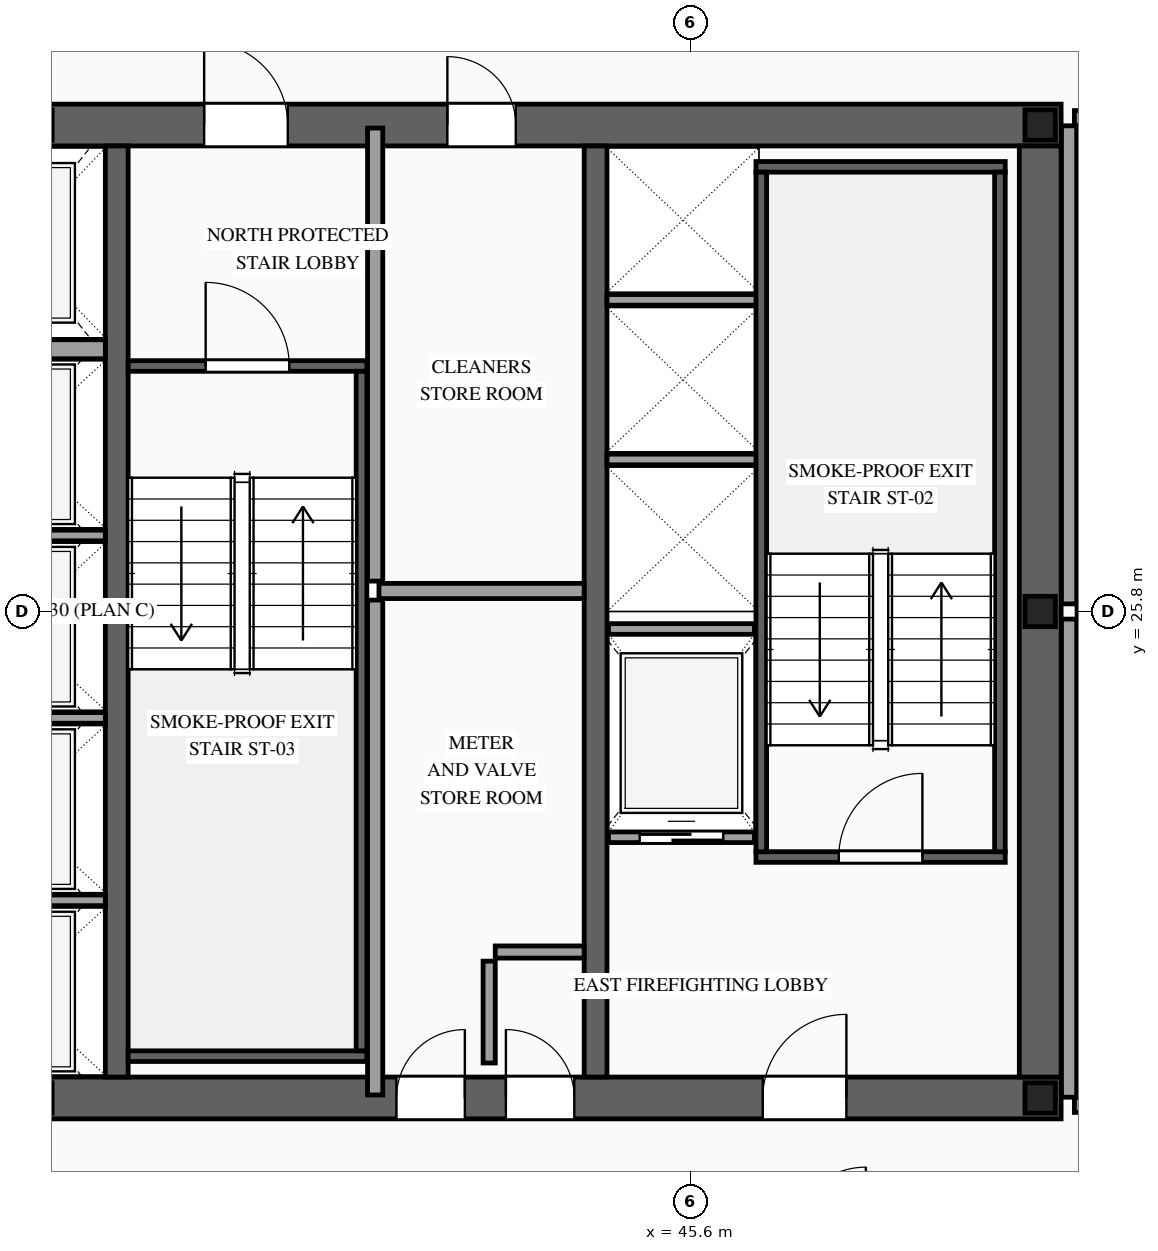
"""IFC4 building model, lengths in metres.
Left out: names, types, materials, properties, quantities, classifications, styles, units other than length and angle.
Written with IfcOpenShell. Run it as: python <this file> out.ifc"""

import sys

from ifc_helpers import new_model, si_unit, direction, frame, frame_2d, origin, origin_2d, place, context, subcontext, project, spatial, rectangle, i_section, extrude, source, transform, mapped, element, fill, save


model = new_model("IFC4")
c1 = context("Model", 3, precision=1e-05, world=origin(), true_north=direction((0.0, 1.0)))
c2 = subcontext(c1, "Body", "Model", "MODEL_VIEW")
j1 = project(units=[si_unit("LENGTHUNIT", "METRE"), si_unit("PLANEANGLEUNIT", "RADIAN")], contexts=[c1])
p1 = place(None, origin())
s1 = spatial("IfcSite", under=j1, at=p1, CompositionType="ELEMENT")
p2 = place(p1, origin())
s2 = spatial("IfcBuilding", under=s1, at=p2, CompositionType="ELEMENT")
p3 = place(p2, frame((0.0, 0.0, 255.6)))
s3 = spatial("IfcBuildingStorey", under=s2, at=p3, CompositionType="ELEMENT", Elevation=255.6)
p4 = place(p3, frame((23.525, 19.4, 0.0), z_axis=(0.0, 0.0, 1.0), x_axis=(1.0, 0.0, 0.0)))
e1 = element("IfcWall", 1, at=p4, inside=s3, PredefinedType="SHEAR", context=c2, shape_type="SweptSolid", body=[
    extrude(rectangle(XDim=26.95, YDim=0.55, at=frame_2d((13.475, 0.0))), origin(), (0.0, 0.0, 1.0), 3.5),
])
p5 = place(p4, frame((1.925, 0.0, 0.0)))
e2 = element("IfcOpeningElement", 2, at=p5, cuts=e1, PredefinedType="OPENING", context=c2, shape_type="SweptSolid", body=[
    extrude(rectangle(XDim=1.1, YDim=2.2, at=frame_2d((0.55, 1.1))), frame((0.0, 0.29, 0.0), z_axis=(0.0, -1.0, 0.0), x_axis=(1.0, 0.0, 0.0)), (0.0, 0.0, 1.0), 0.58),
])
p6 = place(p4, frame((9.825, 0.0, 0.0)))
e3 = element("IfcOpeningElement", 3, at=p6, cuts=e1, PredefinedType="OPENING", context=c2, shape_type="SweptSolid", body=[
    extrude(rectangle(XDim=1.1, YDim=2.2, at=frame_2d((0.55, 1.1))), frame((0.0, 0.29, 0.0), z_axis=(0.0, -1.0, 0.0), x_axis=(1.0, 0.0, 0.0)), (0.0, 0.0, 1.0), 0.58),
])
p7 = place(p4, frame((23.025, 0.0, 0.0)))
e4 = element("IfcOpeningElement", 4, at=p7, cuts=e1, PredefinedType="OPENING", context=c2, shape_type="SweptSolid", body=[
    extrude(rectangle(XDim=1.1, YDim=2.2, at=frame_2d((0.55, 1.1))), frame((0.0, 0.29, 0.0), z_axis=(0.0, -1.0, 0.0), x_axis=(1.0, 0.0, 0.0)), (0.0, 0.0, 1.0), 0.58),
])
p8 = place(p4, frame((19.645, 0.0, 0.0)))
e5 = element("IfcOpeningElement", 5, at=p8, cuts=e1, PredefinedType="OPENING", context=c2, shape_type="SweptSolid", body=[
    extrude(rectangle(XDim=0.9, YDim=2.15, at=frame_2d((0.45, 1.075))), frame((0.0, 0.29, 0.0), z_axis=(0.0, -1.0, 0.0), x_axis=(1.0, 0.0, 0.0)), (0.0, 0.0, 1.0), 0.58),
])
p9 = place(p4, frame((18.205, 0.0, 0.0)))
e6 = element("IfcOpeningElement", 6, at=p9, cuts=e1, PredefinedType="OPENING", context=c2, shape_type="SweptSolid", body=[
    extrude(rectangle(XDim=0.9, YDim=2.15, at=frame_2d((0.45, 1.075))), frame((0.0, 0.29, 0.0), z_axis=(0.0, -1.0, 0.0), x_axis=(1.0, 0.0, 0.0)), (0.0, 0.0, 1.0), 0.58),
])
p10 = place(p3, frame((23.525, 32.2, 0.0), z_axis=(0.0, 0.0, 1.0), x_axis=(1.0, 0.0, 0.0)))
e7 = element("IfcWall", 7, at=p10, inside=s3, PredefinedType="SHEAR", context=c2, shape_type="SweptSolid", body=[
    extrude(rectangle(XDim=26.95, YDim=0.55, at=frame_2d((13.475, 0.0))), origin(), (0.0, 0.0, 1.0), 3.5),
])
p11 = place(p10, frame((4.545, 0.0, 0.0)))
e8 = element("IfcOpeningElement", 8, at=p11, cuts=e7, PredefinedType="OPENING", context=c2, shape_type="SweptSolid", body=[
    extrude(rectangle(XDim=0.9, YDim=2.15, at=frame_2d((0.45, 1.075))), frame((0.0, 0.29, 0.0), z_axis=(0.0, -1.0, 0.0), x_axis=(1.0, 0.0, 0.0)), (0.0, 0.0, 1.0), 0.58),
])
p12 = place(p10, frame((9.825, 0.0, 0.0)))
e9 = element("IfcOpeningElement", 9, at=p12, cuts=e7, PredefinedType="OPENING", context=c2, shape_type="SweptSolid", body=[
    extrude(rectangle(XDim=1.1, YDim=2.2, at=frame_2d((0.55, 1.1))), frame((0.0, 0.29, 0.0), z_axis=(0.0, -1.0, 0.0), x_axis=(1.0, 0.0, 0.0)), (0.0, 0.0, 1.0), 0.58),
])
p13 = place(p10, frame((15.675, 0.0, 0.0)))
e10 = element("IfcOpeningElement", 10, at=p13, cuts=e7, PredefinedType="OPENING", context=c2, shape_type="SweptSolid", body=[
    extrude(rectangle(XDim=1.1, YDim=2.2, at=frame_2d((0.55, 1.1))), frame((0.0, 0.29, 0.0), z_axis=(0.0, -1.0, 0.0), x_axis=(1.0, 0.0, 0.0)), (0.0, 0.0, 1.0), 0.58),
])
p14 = place(p10, frame((18.875, 0.0, 0.0)))
e11 = element("IfcOpeningElement", 11, at=p14, cuts=e7, PredefinedType="OPENING", context=c2, shape_type="SweptSolid", body=[
    extrude(rectangle(XDim=0.9, YDim=2.15, at=frame_2d((0.45, 1.075))), frame((0.0, 0.29, 0.0), z_axis=(0.0, -1.0, 0.0), x_axis=(1.0, 0.0, 0.0)), (0.0, 0.0, 1.0), 0.58),
])
m1 = source(origin(), c2, "Body", "SweptSolid", [
    extrude(rectangle(XDim=12.25, YDim=0.55, at=frame_2d((6.125, 0.0))), origin(), (0.0, 0.0, 1.0), 3.5),
])
p15 = place(p3, frame((50.2, 19.675, 0.0), z_axis=(0.0, 0.0, 1.0), x_axis=(0.0, 1.0, 0.0)))
e12 = element("IfcWall", 12, at=p15, inside=s3, PredefinedType="SHEAR", context=c2, shape_type="MappedRepresentation", body=[
    mapped(m1, transform((0.0, 0.0, 0.0), scale=1.0)),
])
m2 = source(origin(), c2, "Body", "SweptSolid", [
    extrude(rectangle(XDim=12.25, YDim=0.3, at=frame_2d((6.125, 0.0))), origin(), (0.0, 0.0, 1.0), 3.5),
])
for number, where, z_axis, x_axis in (
    (13, (38.05, 19.675, 0.0), (0.0, 0.0, 1.0), (0.0, 1.0, 0.0)),
    (14, (44.35, 19.675, 0.0), (0.0, 0.0, 1.0), (0.0, 1.0, 0.0)),
):
    element("IfcWall", number, at=place(p3, frame(where, z_axis=z_axis, x_axis=x_axis)), inside=s3, PredefinedType="SOLIDWALL", context=c2, shape_type="MappedRepresentation", body=[
        mapped(m2, transform((0.0, 0.0, 0.0), scale=1.0)),
    ])
m3 = source(origin(), c2, "Body", "SweptSolid", [
    extrude(i_section(OverallWidth=0.4, OverallDepth=0.4, WebThickness=0.013, FlangeThickness=0.021, at=origin_2d()), origin(), (0.0, 0.0, 1.0), 3.5),
])
for number, where, z_axis, x_axis in (
    (15, (50.2, 19.4, 0.0), (0.0, 0.0, 1.0), (1.0, 0.0, 0.0)),
    (16, (50.2, 25.8, 0.0), (0.0, 0.0, 1.0), (1.0, 0.0, 0.0)),
    (17, (50.2, 32.2, 0.0), (0.0, 0.0, 1.0), (1.0, 0.0, 0.0)),
):
    element("IfcColumn", number, at=place(p3, frame(where, z_axis=z_axis, x_axis=x_axis)), inside=s3, PredefinedType="COLUMN", context=c2, shape_type="MappedRepresentation", body=[
        mapped(m3, transform((0.0, 0.0, 0.0), scale=1.0)),
    ])
p16 = place(p3, frame((44.52, 22.83, 0.0), z_axis=(0.0, 0.0, 1.0), x_axis=(1.0, 0.0, 0.0)))
e18 = element("IfcWall", 18, at=p16, inside=s3, PredefinedType="SOLIDWALL", context=c2, shape_type="SweptSolid", body=[
    extrude(rectangle(XDim=1.92, YDim=0.14, at=frame_2d((0.96, 0.0))), origin(), (0.0, 0.0, 1.0), 3.2),
])
p17 = place(p16, frame((0.41, 0.0, 0.0)))
e19 = element("IfcOpeningElement", 19, at=p17, cuts=e18, PredefinedType="OPENING", context=c2, shape_type="SweptSolid", body=[
    extrude(rectangle(XDim=1.1, YDim=2.2, at=frame_2d((0.55, 1.1))), frame((0.0, 0.085, 0.0), z_axis=(0.0, -1.0, 0.0), x_axis=(1.0, 0.0, 0.0)), (0.0, 0.0, 1.0), 0.17),
])
m4 = source(origin(), c2, "Body", "SweptSolid", [
    extrude(rectangle(XDim=1.92, YDim=0.14, at=frame_2d((0.96, 0.0))), origin(), (0.0, 0.0, 1.0), 3.2),
])
p18 = place(p3, frame((44.52, 25.57, 0.0), z_axis=(0.0, 0.0, 1.0), x_axis=(1.0, 0.0, 0.0)))
e20 = element("IfcWall", 20, at=p18, inside=s3, PredefinedType="SOLIDWALL", context=c2, shape_type="MappedRepresentation", body=[
    mapped(m4, transform((0.0, 0.0, 0.0), scale=1.0)),
])
m5 = source(origin(), c2, "Body", "SweptSolid", [
    extrude(rectangle(XDim=2.4, YDim=0.14, at=frame_2d((1.2, 0.0))), origin(), (0.0, 0.0, 1.0), 3.2),
])
for number, where, z_axis, x_axis in (
    (21, (35.5, 22.0, 0.0), (0.0, 0.0, 1.0), (1.0, 0.0, 0.0)),
    (22, (35.5, 24.4, 0.0), (0.0, 0.0, 1.0), (1.0, 0.0, 0.0)),
    (23, (35.5, 26.8, 0.0), (0.0, 0.0, 1.0), (1.0, 0.0, 0.0)),
):
    element("IfcWall", number, at=place(p3, frame(where, z_axis=z_axis, x_axis=x_axis)), inside=s3, PredefinedType="SOLIDWALL", context=c2, shape_type="MappedRepresentation", body=[
        mapped(m5, transform((0.0, 0.0, 0.0), scale=1.0)),
    ])
m6 = source(origin(), c2, "Body", "SweptSolid", [
    extrude(rectangle(XDim=2.4, YDim=0.25, at=frame_2d((1.2, 0.0))), origin(), (0.0, 0.0, 1.0), 3.2),
])
p19 = place(p3, frame((35.5, 29.25, 0.0), z_axis=(0.0, 0.0, 1.0), x_axis=(1.0, 0.0, 0.0)))
e24 = element("IfcWall", 24, at=p19, inside=s3, PredefinedType="SOLIDWALL", context=c2, shape_type="MappedRepresentation", body=[
    mapped(m6, transform((0.0, 0.0, 0.0), scale=1.0)),
])
m7 = source(origin(), c2, "Body", "SweptSolid", [
    extrude(rectangle(XDim=2.0, YDim=0.14, at=frame_2d((1.0, 0.0))), origin(), (0.0, 0.0, 1.0), 3.2),
])
for number, where, z_axis, x_axis in (
    (25, (44.5, 27.8, 0.0), (0.0, 0.0, 1.0), (1.0, 0.0, 0.0)),
    (26, (44.5, 29.9, 0.0), (0.0, 0.0, 1.0), (1.0, 0.0, 0.0)),
):
    element("IfcWall", number, at=place(p3, frame(where, z_axis=z_axis, x_axis=x_axis)), inside=s3, PredefinedType="SOLIDWALL", context=c2, shape_type="MappedRepresentation", body=[
        mapped(m7, transform((0.0, 0.0, 0.0), scale=1.0)),
    ])
p20 = place(p3, frame((46.46, 22.57, 0.0), z_axis=(0.0, 0.0, 1.0), x_axis=(1.0, 0.0, 0.0)))
e27 = element("IfcWall", 27, at=p20, inside=s3, PredefinedType="SOLIDWALL", context=c2, shape_type="SweptSolid", body=[
    extrude(rectangle(XDim=3.28, YDim=0.14, at=frame_2d((1.64, 0.0))), origin(), (0.0, 0.0, 1.0), 3.2),
])
p21 = place(p20, frame((1.09, 0.0, 0.0)))
e28 = element("IfcOpeningElement", 28, at=p21, cuts=e27, PredefinedType="OPENING", context=c2, shape_type="SweptSolid", body=[
    extrude(rectangle(XDim=1.1, YDim=2.2, at=frame_2d((0.55, 1.1))), frame((0.0, 0.085, 0.0), z_axis=(0.0, -1.0, 0.0), x_axis=(1.0, 0.0, 0.0)), (0.0, 0.0, 1.0), 0.17),
])
m8 = source(origin(), c2, "Body", "SweptSolid", [
    extrude(rectangle(XDim=3.28, YDim=0.14, at=frame_2d((1.64, 0.0))), origin(), (0.0, 0.0, 1.0), 3.2),
])
p22 = place(p3, frame((46.46, 31.65, 0.0), z_axis=(0.0, 0.0, 1.0), x_axis=(1.0, 0.0, 0.0)))
e29 = element("IfcWall", 29, at=p22, inside=s3, PredefinedType="SOLIDWALL", context=c2, shape_type="MappedRepresentation", body=[
    mapped(m8, transform((0.0, 0.0, 0.0), scale=1.0)),
])
m9 = source(origin(), c2, "Body", "SweptSolid", [
    extrude(rectangle(XDim=8.94, YDim=0.14, at=frame_2d((4.47, 0.0))), origin(), (0.0, 0.0, 1.0), 3.2),
])
for number, where, z_axis, x_axis in (
    (30, (46.53, 22.64, 0.0), (0.0, 0.0, 1.0), (0.0, 1.0, 0.0)),
    (31, (49.67, 22.64, 0.0), (0.0, 0.0, 1.0), (0.0, 1.0, 0.0)),
):
    element("IfcWall", number, at=place(p3, frame(where, z_axis=z_axis, x_axis=x_axis)), inside=s3, PredefinedType="SOLIDWALL", context=c2, shape_type="MappedRepresentation", body=[
        mapped(m9, transform((0.0, 0.0, 0.0), scale=1.0)),
    ])
p23 = place(p3, frame((38.2, 29.03, 0.0), z_axis=(0.0, 0.0, 1.0), x_axis=(1.0, 0.0, 0.0)))
e32 = element("IfcWall", 32, at=p23, inside=s3, PredefinedType="SOLIDWALL", context=c2, shape_type="SweptSolid", body=[
    extrude(rectangle(XDim=3.14, YDim=0.14, at=frame_2d((1.57, 0.0))), origin(), (0.0, 0.0, 1.0), 3.2),
])
p24 = place(p23, frame((1.02, 0.0, 0.0)))
e33 = element("IfcOpeningElement", 33, at=p24, cuts=e32, PredefinedType="OPENING", context=c2, shape_type="SweptSolid", body=[
    extrude(rectangle(XDim=1.1, YDim=2.2, at=frame_2d((0.55, 1.1))), frame((0.0, 0.085, 0.0), z_axis=(0.0, -1.0, 0.0), x_axis=(1.0, 0.0, 0.0)), (0.0, 0.0, 1.0), 0.17),
])
m10 = source(origin(), c2, "Body", "SweptSolid", [
    extrude(rectangle(XDim=3.14, YDim=0.14, at=frame_2d((1.57, 0.0))), origin(), (0.0, 0.0, 1.0), 3.2),
])
p25 = place(p3, frame((38.2, 19.95, 0.0), z_axis=(0.0, 0.0, 1.0), x_axis=(1.0, 0.0, 0.0)))
e34 = element("IfcWall", 34, at=p25, inside=s3, PredefinedType="SOLIDWALL", context=c2, shape_type="MappedRepresentation", body=[
    mapped(m10, transform((0.0, 0.0, 0.0), scale=1.0)),
])
m11 = source(origin(), c2, "Body", "SweptSolid", [
    extrude(rectangle(XDim=8.94, YDim=0.14, at=frame_2d((4.47, 0.0))), origin(), (0.0, 0.0, 1.0), 3.2),
])
p26 = place(p3, frame((41.27, 20.02, 0.0), z_axis=(0.0, 0.0, 1.0), x_axis=(0.0, 1.0, 0.0)))
e35 = element("IfcWall", 35, at=p26, inside=s3, PredefinedType="SOLIDWALL", context=c2, shape_type="MappedRepresentation", body=[
    mapped(m11, transform((0.0, 0.0, 0.0), scale=1.0)),
])
m12 = source(origin(), c2, "Body", "SweptSolid", [
    extrude(rectangle(XDim=1.34, YDim=0.16, at=frame_2d((0.67, 0.0))), origin(), (0.0, 0.0, 1.0), 3.2),
])
p27 = place(p3, frame((42.95, 19.86, 0.0), z_axis=(0.0, 0.0, 1.0), x_axis=(0.0, 1.0, 0.0)))
e36 = element("IfcWall", 36, at=p27, inside=s3, PredefinedType="PARTITIONING", context=c2, shape_type="MappedRepresentation", body=[
    mapped(m12, transform((0.0, 0.0, 0.0), scale=1.0)),
])
m13 = source(origin(), c2, "Body", "SweptSolid", [
    extrude(rectangle(XDim=1.17, YDim=0.16, at=frame_2d((0.585, 0.0))), origin(), (0.0, 0.0, 1.0), 3.2),
])
p28 = place(p3, frame((43.03, 21.32, 0.0), z_axis=(0.0, 0.0, 1.0), x_axis=(1.0, 0.0, 0.0)))
e37 = element("IfcWall", 37, at=p28, inside=s3, PredefinedType="PARTITIONING", context=c2, shape_type="MappedRepresentation", body=[
    mapped(m13, transform((0.0, 0.0, 0.0), scale=1.0)),
])
m14 = source(origin(), c2, "Body", "SweptSolid", [
    extrude(rectangle(XDim=6.51, YDim=0.2, at=frame_2d((3.255, 0.0))), origin(), (0.0, 0.0, 1.0), 3.2),
])
p29 = place(p3, frame((41.45, 19.44, 0.0), z_axis=(0.0, 0.0, 1.0), x_axis=(0.0, 1.0, 0.0)))
e38 = element("IfcWall", 38, at=p29, inside=s3, PredefinedType="PARTITIONING", context=c2, shape_type="MappedRepresentation", body=[
    mapped(m14, transform((0.0, 0.0, 0.0), scale=1.0)),
])
m15 = source(origin(), c2, "Body", "SweptSolid", [
    extrude(rectangle(XDim=2.7, YDim=0.2, at=frame_2d((1.35, 0.0))), origin(), (0.0, 0.0, 1.0), 3.2),
])
p30 = place(p3, frame((41.5, 26.07, 0.0), z_axis=(0.0, 0.0, 1.0), x_axis=(1.0, 0.0, 0.0)))
e39 = element("IfcWall", 39, at=p30, inside=s3, PredefinedType="PARTITIONING", context=c2, shape_type="MappedRepresentation", body=[
    mapped(m15, transform((0.0, 0.0, 0.0), scale=1.0)),
])
m16 = source(origin(), c2, "Body", "SweptSolid", [
    extrude(rectangle(XDim=5.96, YDim=0.2, at=frame_2d((2.98, 0.0))), origin(), (0.0, 0.0, 1.0), 3.2),
])
p31 = place(p3, frame((41.45, 26.2, 0.0), z_axis=(0.0, 0.0, 1.0), x_axis=(0.0, 1.0, 0.0)))
e40 = element("IfcWall", 40, at=p31, inside=s3, PredefinedType="PARTITIONING", context=c2, shape_type="MappedRepresentation", body=[
    mapped(m16, transform((0.0, 0.0, 0.0), scale=1.0)),
])
p32 = place(p3, frame((50.65, 19.31, 0.0), z_axis=(0.0, 0.0, 1.0), x_axis=(1.0, 0.0, 0.0)))
e41 = element("IfcWall", 41, at=p32, inside=s3, PredefinedType="PARTITIONING", context=c2, shape_type="SweptSolid", body=[
    extrude(rectangle(XDim=6.8, YDim=0.2, at=frame_2d((3.4, 0.0))), origin(), (0.0, 0.0, 1.0), 2.745),
])
p33 = place(p32, frame((2.8, 0.0, 0.0)))
e42 = element("IfcOpeningElement", 42, at=p33, cuts=e41, PredefinedType="OPENING", context=c2, shape_type="SweptSolid", body=[
    extrude(rectangle(XDim=1.0, YDim=2.2, at=frame_2d((0.5, 1.1))), frame((0.0, 0.115, 0.0), z_axis=(0.0, -1.0, 0.0), x_axis=(1.0, 0.0, 0.0)), (0.0, 0.0, 1.0), 0.23),
])
m17 = source(origin(), c2, "Body", "SweptSolid", [
    extrude(rectangle(XDim=6.765, YDim=0.2, at=frame_2d((3.382, 0.0))), origin(), (0.0, 0.0, 1.0), 2.707),
])
p34 = place(p3, frame((50.685, 25.8, 0.0), z_axis=(0.0, 0.0, 1.0), x_axis=(1.0, 0.0, 0.0)))
e43 = element("IfcWall", 43, at=p34, inside=s3, PredefinedType="PARTITIONING", context=c2, shape_type="MappedRepresentation", body=[
    mapped(m17, transform((0.0, 0.0, 0.0), scale=1.0)),
])
m18 = source(origin(), c2, "Body", "SweptSolid", [
    extrude(rectangle(XDim=6.29, YDim=0.2, at=frame_2d((3.145, 0.0))), origin(), (0.0, 0.0, 1.0), 3.2),
])
p35 = place(p3, frame((50.58, 19.41, 0.0), z_axis=(0.0, 0.0, 1.0), x_axis=(0.0, 1.0, 0.0)))
e44 = element("IfcWall", 44, at=p35, inside=s3, PredefinedType="PARTITIONING", context=c2, shape_type="MappedRepresentation", body=[
    mapped(m18, transform((0.0, 0.0, 0.0), scale=1.0)),
])
p36 = place(p3, frame((50.65, 32.29, 0.0), z_axis=(0.0, 0.0, 1.0), x_axis=(1.0, 0.0, 0.0)))
e45 = element("IfcWall", 45, at=p36, inside=s3, PredefinedType="PARTITIONING", context=c2, shape_type="SweptSolid", body=[
    extrude(rectangle(XDim=6.8, YDim=0.2, at=frame_2d((3.4, 0.0))), origin(), (0.0, 0.0, 1.0), 2.745),
])
p37 = place(p36, frame((2.835, 0.0, 0.0)))
e46 = element("IfcOpeningElement", 46, at=p37, cuts=e45, PredefinedType="OPENING", context=c2, shape_type="SweptSolid", body=[
    extrude(rectangle(XDim=1.0, YDim=2.2, at=frame_2d((0.5, 1.1))), frame((0.0, 0.115, 0.0), z_axis=(0.0, -1.0, 0.0), x_axis=(1.0, 0.0, 0.0)), (0.0, 0.0, 1.0), 0.23),
])
p38 = place(p3, frame((50.58, 25.9, 0.0), z_axis=(0.0, 0.0, 1.0), x_axis=(0.0, 1.0, 0.0)))
e47 = element("IfcWall", 47, at=p38, inside=s3, PredefinedType="PARTITIONING", context=c2, shape_type="MappedRepresentation", body=[
    mapped(m18, transform((0.0, 0.0, 0.0), scale=1.0)),
])
m19 = source(origin(), c2, "Body", "SweptSolid", [
    extrude(rectangle(XDim=1.1, YDim=2.2, at=frame_2d((0.55, 1.1))), frame((0.0, 0.025, 0.0), z_axis=(0.0, -1.0, 0.0), x_axis=(1.0, 0.0, 0.0)), (0.0, 0.0, 1.0), 0.05),
])
p39 = place(p17, origin())
e48 = element("IfcDoor", 48, at=p39, inside=s3, OperationType="SLIDING_TO_RIGHT", PredefinedType="DOOR", context=c2, shape_type="MappedRepresentation", body=[
    mapped(m19, transform((0.0, 0.0, 0.0), scale=1.0)),
])
fill(e19, e48)
m20 = source(origin(), c2, "Body", "SweptSolid", [
    extrude(rectangle(XDim=1.1, YDim=2.2, at=frame_2d((0.55, 1.1))), frame((0.0, 0.025, 0.0), z_axis=(0.0, -1.0, 0.0), x_axis=(1.0, 0.0, 0.0)), (0.0, 0.0, 1.0), 0.05),
])
p40 = place(p21, origin())
e49 = element("IfcDoor", 49, at=p40, inside=s3, OperationType="SINGLE_SWING_RIGHT", PredefinedType="DOOR", context=c2, shape_type="MappedRepresentation", body=[
    mapped(m20, transform((0.0, 0.0, 0.0), scale=1.0)),
])
fill(e28, e49)
p41 = place(p24, origin())
e50 = element("IfcDoor", 50, at=p41, inside=s3, OperationType="SINGLE_SWING_LEFT", PredefinedType="DOOR", context=c2, shape_type="MappedRepresentation", body=[
    mapped(m20, transform((0.0, 0.0, 0.0), scale=1.0)),
])
fill(e33, e50)
p42 = place(p7, origin())
e51 = element("IfcDoor", 51, at=p42, inside=s3, OperationType="SINGLE_SWING_RIGHT", PredefinedType="DOOR", context=c2, shape_type="MappedRepresentation", body=[
    mapped(m20, transform((0.0, 0.0, 0.0), scale=1.0)),
])
fill(e4, e51)
p43 = place(p13, origin())
e52 = element("IfcDoor", 52, at=p43, inside=s3, OperationType="SINGLE_SWING_LEFT", PredefinedType="DOOR", context=c2, shape_type="MappedRepresentation", body=[
    mapped(m20, transform((0.0, 0.0, 0.0), scale=1.0)),
])
fill(e10, e52)
m21 = source(origin(), c2, "Body", "SweptSolid", [
    extrude(rectangle(XDim=0.9, YDim=2.15, at=frame_2d((0.45, 1.075))), frame((0.0, 0.025, 0.0), z_axis=(0.0, -1.0, 0.0), x_axis=(1.0, 0.0, 0.0)), (0.0, 0.0, 1.0), 0.05),
])
p44 = place(p8, origin())
e53 = element("IfcDoor", 53, at=p44, inside=s3, OperationType="SINGLE_SWING_LEFT", PredefinedType="DOOR", context=c2, shape_type="MappedRepresentation", body=[
    mapped(m21, transform((0.0, 0.0, 0.0), scale=1.0)),
])
fill(e5, e53)
p45 = place(p9, origin())
e54 = element("IfcDoor", 54, at=p45, inside=s3, OperationType="SINGLE_SWING_RIGHT", PredefinedType="DOOR", context=c2, shape_type="MappedRepresentation", body=[
    mapped(m21, transform((0.0, 0.0, 0.0), scale=1.0)),
])
fill(e6, e54)
p46 = place(p14, origin())
e55 = element("IfcDoor", 55, at=p46, inside=s3, OperationType="SINGLE_SWING_LEFT", PredefinedType="DOOR", context=c2, shape_type="MappedRepresentation", body=[
    mapped(m21, transform((0.0, 0.0, 0.0), scale=1.0)),
])
fill(e11, e55)
save(model, sys.argv[1])
